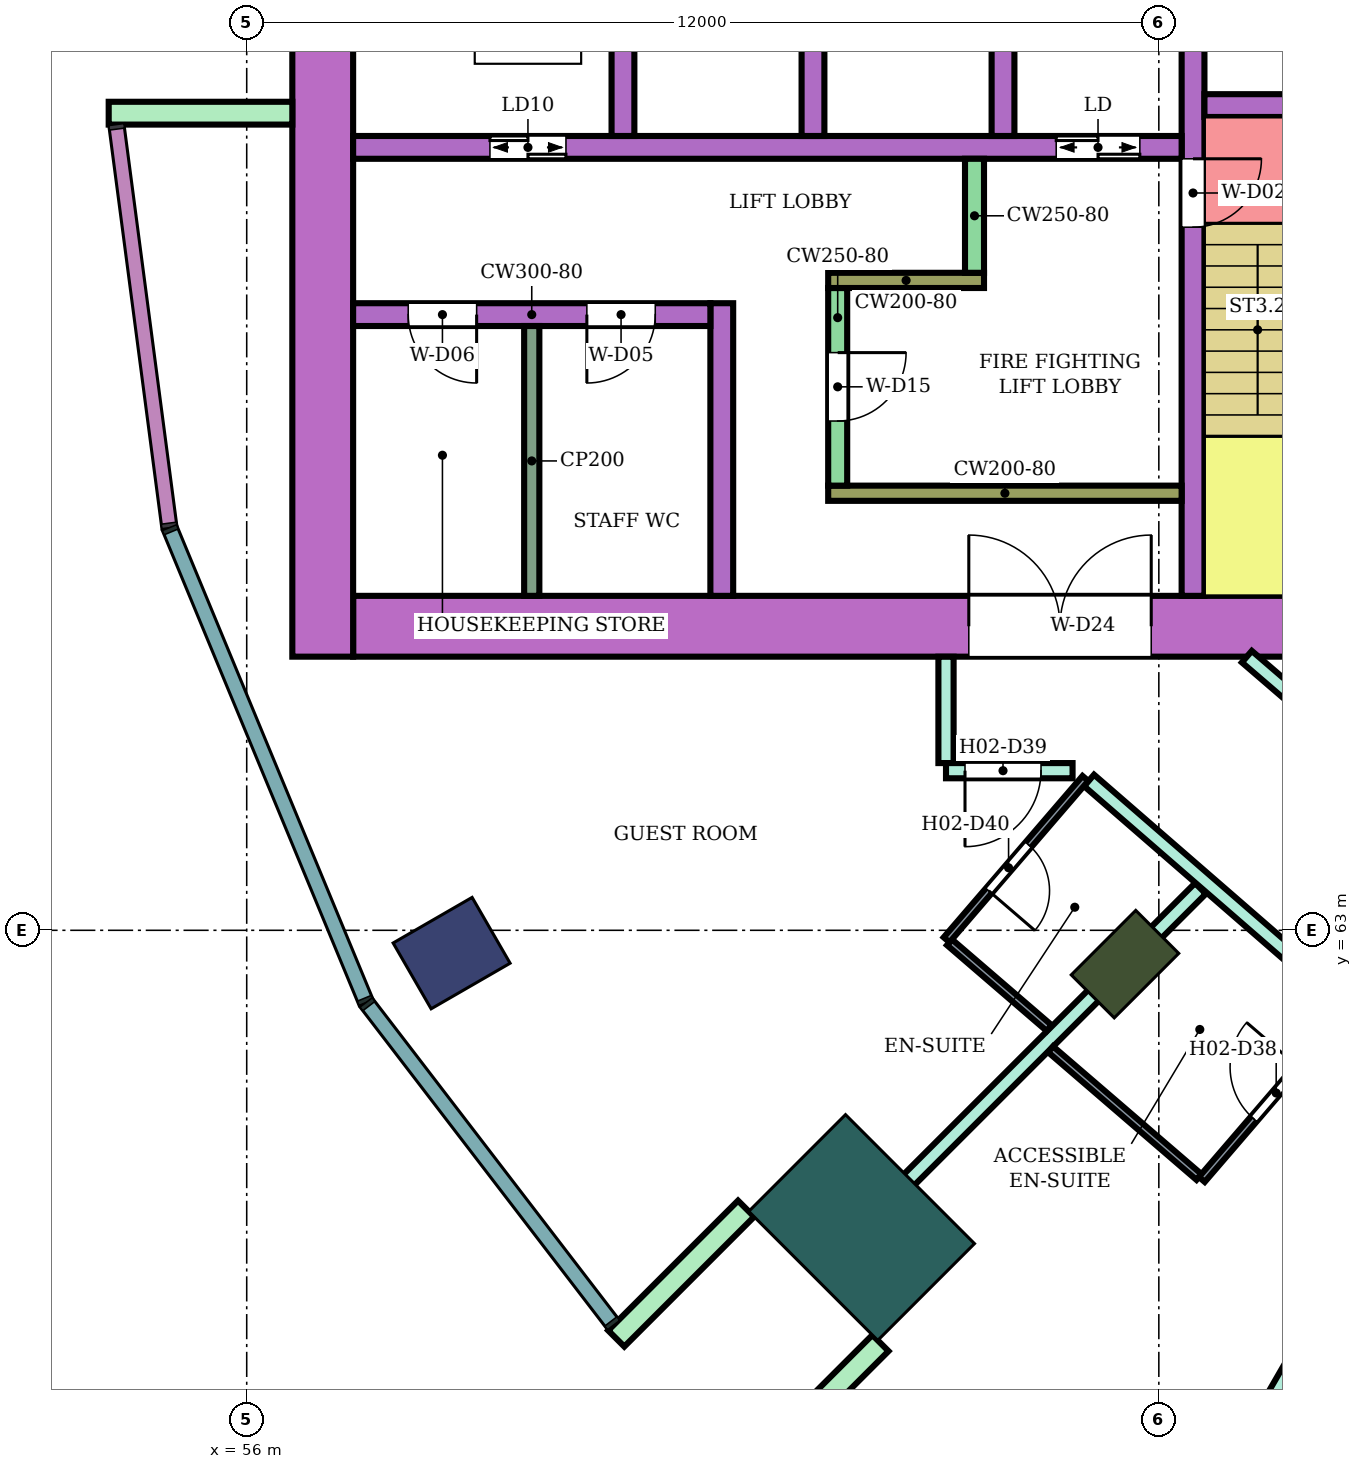
"""IFC4 building model, lengths in metres.
Left out: names, types, materials, properties, quantities, classifications, styles, units other than length and angle.
Written with IfcOpenShell. Run it as: python <this file> out.ifc"""

import sys

from ifc_helpers import new_model, si_unit, direction, frame, frame_2d, origin, origin_2d, place, context, subcontext, project, spatial, rectangle, extrude, element, fill, save


model = new_model("IFC4")
c1 = context("Model", 3, precision=1e-05, world=origin(), true_north=direction((0.0, 1.0)))
c2 = subcontext(c1, "Body", "Model", "MODEL_VIEW")
j1 = project(units=[si_unit("LENGTHUNIT", "METRE"), si_unit("PLANEANGLEUNIT", "RADIAN")], contexts=[c1])
p1 = place(None, origin())
s1 = spatial("IfcSite", under=j1, at=p1, CompositionType="ELEMENT")
p2 = place(p1, origin())
s2 = spatial("IfcBuilding", under=s1, at=p2, CompositionType="ELEMENT")
p3 = place(p2, frame((0.0, 0.0, 47.8)))
s3 = spatial("IfcBuildingStorey", under=s2, at=p3, CompositionType="ELEMENT", Elevation=47.8)
p4 = place(p3, frame((58.696, 62.7, 0.0), z_axis=(0.0, 0.0, 1.0), x_axis=(-0.866025403784, -0.5, 0.0)))
e1 = element("IfcColumn", 1, at=p4, inside=s3, PredefinedType="COLUMN", context=c2, shape_type="SweptSolid", body=[
    extrude(rectangle(XDim=1.2, YDim=1.0, at=origin_2d()), origin(), (0.0, 0.0, 1.0), 3.8),
])
p5 = place(p3, frame((67.555, 62.555, 0.0), z_axis=(0.0, 0.0, 1.0), x_axis=(-0.707106781187, -0.707106781187, 0.0)))
e2 = element("IfcColumn", 2, at=p5, inside=s3, PredefinedType="COLUMN", context=c2, shape_type="SweptSolid", body=[
    extrude(rectangle(XDim=1.2, YDim=0.8, at=origin_2d()), origin(), (0.0, 0.0, 1.0), 3.8),
])
p6 = place(p3, frame((64.09, 59.09, 0.0), z_axis=(0.0, 0.0, 1.0), x_axis=(-0.707106781187, -0.707106781187, 0.0)))
e3 = element("IfcColumn", 3, at=p6, inside=s3, PredefinedType="COLUMN", context=c2, shape_type="SweptSolid", body=[
    extrude(rectangle(XDim=1.8, YDim=2.4, at=origin_2d()), origin(), (0.0, 0.0, 1.0), 3.8),
])
p7 = place(p3, frame((72.1, 67.0, 0.0), z_axis=(0.0, 0.0, 1.0), x_axis=(-1.0, 0.0, 0.0)))
e4 = element("IfcWall", 4, at=p7, inside=s3, PredefinedType="SHEAR", context=c2, shape_type="SweptSolid", body=[
    extrude(rectangle(XDim=14.7, YDim=0.8, at=frame_2d((7.35, 0.0))), origin(), (0.0, 0.0, 1.0), 3.48),
])
p8 = place(p7, frame((4.2, 0.0, 0.0)))
e5 = element("IfcOpeningElement", 5, at=p8, cuts=e4, PredefinedType="OPENING", context=c2, shape_type="SweptSolid", body=[
    extrude(rectangle(XDim=2.4, YDim=2.4, at=frame_2d((1.2, 1.2))), frame((0.0, 0.41, 0.0), z_axis=(0.0, -1.0, 0.0), x_axis=(1.0, 0.0, 0.0)), (0.0, 0.0, 1.0), 0.82),
])
p9 = place(p3, frame((57.0, 83.4, 0.0), z_axis=(0.0, 0.0, 1.0), x_axis=(0.0, -1.0, 0.0)))
e6 = element("IfcWall", 6, at=p9, inside=s3, PredefinedType="SHEAR", context=c2, shape_type="SweptSolid", body=[
    extrude(rectangle(XDim=16.8, YDim=0.8, at=frame_2d((8.4, 0.0))), origin(), (0.0, 0.0, 1.0), 3.48),
])
p10 = place(p3, frame((68.45, 75.0, 0.0), z_axis=(0.0, 0.0, 1.0), x_axis=(0.0, -1.0, 0.0)))
e7 = element("IfcWall", 7, at=p10, inside=s3, PredefinedType="SHEAR", context=c2, shape_type="SweptSolid", body=[
    extrude(rectangle(XDim=7.6, YDim=0.3, at=frame_2d((3.8, 0.0))), origin(), (0.0, 0.0, 1.0), 3.48),
])
p11 = place(p10, frame((1.85, 0.0, 0.0)))
e8 = element("IfcOpeningElement", 8, at=p11, cuts=e7, PredefinedType="OPENING", context=c2, shape_type="SweptSolid", body=[
    extrude(rectangle(XDim=0.9, YDim=2.1, at=frame_2d((0.45, 1.05))), frame((0.0, 0.16, 0.0), z_axis=(0.0, -1.0, 0.0), x_axis=(1.0, 0.0, 0.0)), (0.0, 0.0, 1.0), 0.32),
])
p12 = place(p3, frame((71.65, 73.85, 0.0), z_axis=(0.0, 0.0, 1.0), x_axis=(-1.0, 0.0, 0.0)))
e9 = element("IfcWall", 9, at=p12, inside=s3, PredefinedType="SHEAR", context=c2, shape_type="SweptSolid", body=[
    extrude(rectangle(XDim=3.05, YDim=0.3, at=frame_2d((1.525, 0.0))), origin(), (0.0, 0.0, 1.0), 3.48),
])
p13 = place(p12, frame((1.1, 0.0, 0.0)))
e10 = element("IfcOpeningElement", 10, at=p13, cuts=e9, PredefinedType="OPENING", context=c2, shape_type="SweptSolid", body=[
    extrude(rectangle(XDim=0.7, YDim=2.0, at=frame_2d((0.35, 1.0))), frame((0.0, 0.16, 0.0), z_axis=(0.0, -1.0, 0.0), x_axis=(1.0, 0.0, 0.0)), (0.0, 0.0, 1.0), 0.32),
])
p14 = place(p3, frame((68.3, 73.3, 0.0), z_axis=(0.0, 0.0, 1.0), x_axis=(-1.0, 0.0, 0.0)))
e11 = element("IfcWall", 11, at=p14, inside=s3, PredefinedType="SHEAR", context=c2, shape_type="SweptSolid", body=[
    extrude(rectangle(XDim=10.9, YDim=0.3, at=frame_2d((5.45, 0.0))), origin(), (0.0, 0.0, 1.0), 3.48),
])
p15 = place(p14, frame((0.55, 0.0, 0.0)))
e12 = element("IfcOpeningElement", 12, at=p15, cuts=e11, PredefinedType="OPENING", context=c2, shape_type="SweptSolid", body=[
    extrude(rectangle(XDim=1.1, YDim=2.1, at=frame_2d((0.55, 1.05))), frame((0.0, 0.16, 0.0), z_axis=(0.0, -1.0, 0.0), x_axis=(1.0, 0.0, 0.0)), (0.0, 0.0, 1.0), 0.32),
])
p16 = place(p14, frame((8.1, 0.0, 0.0)))
e13 = element("IfcOpeningElement", 13, at=p16, cuts=e11, PredefinedType="OPENING", context=c2, shape_type="SweptSolid", body=[
    extrude(rectangle(XDim=1.0, YDim=2.1, at=frame_2d((0.5, 1.05))), frame((0.0, 0.16, 0.0), z_axis=(0.0, -1.0, 0.0), x_axis=(1.0, 0.0, 0.0)), (0.0, 0.0, 1.0), 0.32),
])
for number, where, z_axis, x_axis in (
    (14, (65.95, 76.0, 0.0), (0.0, 0.0, 1.0), (0.0, -1.0, 0.0)),
    (15, (63.45, 76.0, 0.0), (0.0, 0.0, 1.0), (0.0, -1.0, 0.0)),
    (16, (60.95, 76.0, 0.0), (0.0, 0.0, 1.0), (0.0, -1.0, 0.0)),
):
    element("IfcWall", number, at=place(p3, frame(where, z_axis=z_axis, x_axis=x_axis)), inside=s3, PredefinedType="SHEAR", context=c2, shape_type="SweptSolid", body=[
        extrude(rectangle(XDim=2.55, YDim=0.3, at=frame_2d((1.275, 0.0))), origin(), (0.0, 0.0, 1.0), 3.48),
    ])
p17 = place(p3, frame((68.3, 68.75, 0.0), z_axis=(0.0, 0.0, 1.0), x_axis=(-1.0, 0.0, 0.0)))
e17 = element("IfcWall", 17, at=p17, inside=s3, PredefinedType="SHEAR", context=c2, shape_type="SweptSolid", body=[
    extrude(rectangle(XDim=4.65, YDim=0.2, at=frame_2d((2.325, 0.0))), origin(), (0.0, 0.0, 1.0), 3.48),
])
p18 = place(p3, frame((63.775, 71.45, 0.0), z_axis=(0.0, 0.0, 1.0), x_axis=(0.0, -1.0, 0.0)))
e18 = element("IfcWall", 18, at=p18, inside=s3, PredefinedType="SHEAR", context=c2, shape_type="SweptSolid", body=[
    extrude(rectangle(XDim=2.6, YDim=0.25, at=frame_2d((1.3, 0.0))), origin(), (0.0, 0.0, 1.0), 3.48),
])
p19 = place(p18, frame((0.85, 0.0, 0.0)))
e19 = element("IfcOpeningElement", 19, at=p19, cuts=e18, PredefinedType="OPENING", context=c2, shape_type="SweptSolid", body=[
    extrude(rectangle(XDim=0.9, YDim=2.1, at=frame_2d((0.45, 1.05))), frame((0.0, 0.135, 0.0), z_axis=(0.0, -1.0, 0.0), x_axis=(1.0, 0.0, 0.0)), (0.0, 0.0, 1.0), 0.27),
])
p20 = place(p3, frame((65.7, 71.55, 0.0), z_axis=(0.0, 0.0, 1.0), x_axis=(-1.0, 0.0, 0.0)))
e20 = element("IfcWall", 20, at=p20, inside=s3, PredefinedType="SHEAR", context=c2, shape_type="SweptSolid", body=[
    extrude(rectangle(XDim=2.05, YDim=0.2, at=frame_2d((1.025, 0.0))), origin(), (0.0, 0.0, 1.0), 3.48),
])
p21 = place(p3, frame((65.575, 73.15, 0.0), z_axis=(0.0, 0.0, 1.0), x_axis=(0.0, -1.0, 0.0)))
e21 = element("IfcWall", 21, at=p21, inside=s3, PredefinedType="SHEAR", context=c2, shape_type="SweptSolid", body=[
    extrude(rectangle(XDim=1.5, YDim=0.25, at=frame_2d((0.75, 0.0))), origin(), (0.0, 0.0, 1.0), 3.48),
])
p22 = place(p3, frame((62.25, 71.25, 0.0), z_axis=(0.0, 0.0, 1.0), x_axis=(0.0, -1.0, 0.0)))
e22 = element("IfcWall", 22, at=p22, inside=s3, PredefinedType="SHEAR", context=c2, shape_type="SweptSolid", body=[
    extrude(rectangle(XDim=3.85, YDim=0.3, at=frame_2d((1.925, 0.0))), origin(), (0.0, 0.0, 1.0), 3.48),
])
p23 = place(p3, frame((62.1, 71.1, 0.0), z_axis=(0.0, 0.0, 1.0), x_axis=(-1.0, 0.0, 0.0)))
e23 = element("IfcWall", 23, at=p23, inside=s3, PredefinedType="SHEAR", context=c2, shape_type="SweptSolid", body=[
    extrude(rectangle(XDim=4.7, YDim=0.3, at=frame_2d((2.35, 0.0))), origin(), (0.0, 0.0, 1.0), 3.48),
])
p24 = place(p23, frame((0.725, 0.0, 0.0)))
e24 = element("IfcOpeningElement", 24, at=p24, cuts=e23, PredefinedType="OPENING", context=c2, shape_type="SweptSolid", body=[
    extrude(rectangle(XDim=0.9, YDim=2.1, at=frame_2d((0.45, 1.05))), frame((0.0, 0.16, 0.0), z_axis=(0.0, -1.0, 0.0), x_axis=(1.0, 0.0, 0.0)), (0.0, 0.0, 1.0), 0.32),
])
p25 = place(p23, frame((3.075, 0.0, 0.0)))
e25 = element("IfcOpeningElement", 25, at=p25, cuts=e23, PredefinedType="OPENING", context=c2, shape_type="SweptSolid", body=[
    extrude(rectangle(XDim=0.9, YDim=2.1, at=frame_2d((0.45, 1.05))), frame((0.0, 0.16, 0.0), z_axis=(0.0, -1.0, 0.0), x_axis=(1.0, 0.0, 0.0)), (0.0, 0.0, 1.0), 0.32),
])
for number, where, z_axis, x_axis in (
    (26, (56.6, 73.75, 0.0), (0.0, 0.0, 1.0), (-1.0, 0.0, 0.0)),
    (27, (62.57, 59.338, 0.0), (0.0, 0.0, 1.0), (-0.707, -0.707, 0.0)),
    (28, (64.338, 57.57, 0.0), (0.0, 0.0, 1.0), (-0.707, -0.707, 0.0)),
):
    element("IfcWall", number, at=place(p3, frame(where, z_axis=z_axis, x_axis=x_axis)), inside=s3, PredefinedType="NOTDEFINED", context=c2, shape_type="SweptSolid", body=[
        extrude(rectangle(XDim=2.416, YDim=0.3, at=frame_2d((1.208, 0.0))), origin(), (0.0, 0.0, 1.0), 3.8),
    ])
p26 = place(p3, frame((63.594, 58.598, 0.0), z_axis=(0.0, 0.0, 1.0), x_axis=(0.707228748718, 0.706984792613, 0.0)))
e29 = element("IfcWall", 29, at=p26, inside=s3, PredefinedType="PARTITIONING", context=c2, shape_type="SweptSolid", body=[
    extrude(rectangle(XDim=7.005, YDim=0.2, at=frame_2d((3.503, 0.0))), origin(), (0.0, 0.0, 1.0), 3.35),
])
p27 = place(p3, frame((65.2, 65.2, 0.0), z_axis=(0.0, 0.0, 1.0), x_axis=(0.0, 1.0, 0.0)))
e30 = element("IfcWall", 30, at=p27, inside=s3, PredefinedType="PARTITIONING", context=c2, shape_type="SweptSolid", body=[
    extrude(rectangle(XDim=1.399, YDim=0.2, at=frame_2d((0.7, 0.0))), origin(), (0.0, 0.0, 1.0), 3.35),
])
p28 = place(p3, frame((65.2, 65.1, 0.0), z_axis=(0.0, 0.0, 1.0), x_axis=(1.0, 0.0, 0.0)))
e31 = element("IfcWall", 31, at=p28, inside=s3, PredefinedType="PARTITIONING", context=c2, shape_type="SweptSolid", body=[
    extrude(rectangle(XDim=1.665, YDim=0.2, at=frame_2d((0.833, 0.0))), origin(), (0.0, 0.0, 1.0), 3.35),
])
p29 = place(p28, frame((0.25, 0.0, 0.0)))
e32 = element("IfcOpeningElement", 32, at=p29, cuts=e31, PredefinedType="OPENING", context=c2, shape_type="SweptSolid", body=[
    extrude(rectangle(XDim=1.0, YDim=2.1, at=frame_2d((0.5, 1.05))), frame((0.0, 0.11, 0.0), z_axis=(0.0, -1.0, 0.0), x_axis=(1.0, 0.0, 0.0)), (0.0, 0.0, 1.0), 0.22),
])
p30 = place(p3, frame((67.082, 64.972, 0.0), z_axis=(0.0, 0.0, 1.0), x_axis=(0.755033632617, -0.655686063309, 0.0)))
e33 = element("IfcWall", 33, at=p30, inside=s3, PredefinedType="PARTITIONING", context=c2, shape_type="SweptSolid", body=[
    extrude(rectangle(XDim=6.185, YDim=0.2, at=frame_2d((3.093, 0.0))), origin(), (0.0, 0.0, 1.0), 3.35),
])
p31 = place(p30, frame((4.778, 0.0, 0.0)))
e34 = element("IfcOpeningElement", 34, at=p31, cuts=e33, PredefinedType="OPENING", context=c2, shape_type="SweptSolid", body=[
    extrude(rectangle(XDim=1.1, YDim=2.1, at=frame_2d((0.55, 1.05))), frame((0.0, 0.11, 0.0), z_axis=(0.0, -1.0, 0.0), x_axis=(1.0, 0.0, 0.0)), (0.0, 0.0, 1.0), 0.22),
])
p32 = place(p3, frame((67.094, 52.663, 0.0), z_axis=(0.0, 0.0, 1.0), x_axis=(0.500216854217, 0.865900166738, 0.0)))
e35 = element("IfcWall", 35, at=p32, inside=s3, PredefinedType="PARTITIONING", context=c2, shape_type="SweptSolid", body=[
    extrude(rectangle(XDim=9.375, YDim=0.2, at=frame_2d((4.688, 0.0))), origin(), (0.0, 0.0, 1.0), 3.35),
])
p33 = place(p3, frame((69.158, 66.6, 0.0), z_axis=(0.0, 0.0, 1.0), x_axis=(0.758063092745, -0.652181222835, 0.0)))
e36 = element("IfcWall", 36, at=p33, inside=s3, PredefinedType="PARTITIONING", context=c2, shape_type="SweptSolid", body=[
    extrude(rectangle(XDim=5.16, YDim=0.2, at=frame_2d((2.58, 0.0))), origin(), (0.0, 0.0, 1.0), 3.35),
])
p34 = place(p33, frame((2.165, 0.0, 0.0)))
e37 = element("IfcOpeningElement", 37, at=p34, cuts=e36, PredefinedType="OPENING", context=c2, shape_type="SweptSolid", body=[
    extrude(rectangle(XDim=0.9, YDim=2.1, at=frame_2d((0.45, 1.05))), frame((0.0, 0.11, 0.0), z_axis=(0.0, -1.0, 0.0), x_axis=(1.0, 0.0, 0.0)), (0.0, 0.0, 1.0), 0.22),
])
p35 = place(p3, frame((65.246, 62.842, 0.0), z_axis=(0.0, 0.0, 1.0), x_axis=(0.758030338995, -0.652219292234, 0.0)))
e38 = element("IfcWall", 38, at=p35, inside=s3, PredefinedType="PARTITIONING", context=c2, shape_type="SweptSolid", body=[
    extrude(rectangle(XDim=1.73, YDim=0.1, at=frame_2d((0.865, 0.0))), origin(), (0.0, 0.0, 1.0), 3.35),
])
p36 = place(p3, frame((65.208, 62.875, 0.0), z_axis=(0.0, 0.0, 1.0), x_axis=(0.65205430601, 0.758172264076, 0.0)))
e39 = element("IfcWall", 39, at=p36, inside=s3, PredefinedType="PARTITIONING", context=c2, shape_type="SweptSolid", body=[
    extrude(rectangle(XDim=2.8, YDim=0.1, at=frame_2d((1.4, 0.0))), origin(), (0.0, 0.0, 1.0), 3.35),
])
p37 = place(p36, frame((0.85, 0.0, 0.0)))
e40 = element("IfcOpeningElement", 40, at=p37, cuts=e39, PredefinedType="OPENING", context=c2, shape_type="SweptSolid", body=[
    extrude(rectangle(XDim=0.8, YDim=2.1, at=frame_2d((0.4, 1.05))), frame((0.0, 0.06, 0.0), z_axis=(0.0, -1.0, 0.0), x_axis=(1.0, 0.0, 0.0)), (0.0, 0.0, 1.0), 0.12),
])
p38 = place(p3, frame((66.576, 61.435, 0.0), z_axis=(0.0, 0.0, 1.0), x_axis=(0.757970550281, -0.652288774169, 0.0)))
e41 = element("IfcWall", 41, at=p38, inside=s3, PredefinedType="PARTITIONING", context=c2, shape_type="SweptSolid", body=[
    extrude(rectangle(XDim=2.576, YDim=0.1, at=frame_2d((1.288, 0.0))), origin(), (0.0, 0.0, 1.0), 3.35),
])
p39 = place(p3, frame((68.566, 59.722, 0.0), z_axis=(0.0, 0.0, 1.0), x_axis=(0.65193146671, 0.758277892803, 0.0)))
e42 = element("IfcWall", 42, at=p39, inside=s3, PredefinedType="PARTITIONING", context=c2, shape_type="SweptSolid", body=[
    extrude(rectangle(XDim=2.89, YDim=0.1, at=frame_2d((1.445, 0.0))), origin(), (0.0, 0.0, 1.0), 3.35),
])
p40 = place(p39, frame((1.05, 0.0, 0.0)))
e43 = element("IfcOpeningElement", 43, at=p40, cuts=e42, PredefinedType="OPENING", context=c2, shape_type="SweptSolid", body=[
    extrude(rectangle(XDim=0.9, YDim=2.1, at=frame_2d((0.45, 1.05))), frame((0.0, 0.06, 0.0), z_axis=(0.0, -1.0, 0.0), x_axis=(1.0, 0.0, 0.0)), (0.0, 0.0, 1.0), 0.12),
])
p41 = place(p3, frame((59.75, 70.95, 0.0), z_axis=(0.0, 0.0, 1.0), x_axis=(0.0, -1.0, 0.0)))
e44 = element("IfcWall", 44, at=p41, inside=s3, PredefinedType="PARTITIONING", context=c2, shape_type="SweptSolid", body=[
    extrude(rectangle(XDim=3.55, YDim=0.2, at=frame_2d((1.775, 0.0))), origin(), (0.0, 0.0, 1.0), 3.48),
])
p42 = place(p40, origin())
e45 = element("IfcDoor", 45, at=p42, inside=s3, OperationType="SINGLE_SWING_RIGHT", PredefinedType="DOOR", context=c2, shape_type="SweptSolid", body=[
    extrude(rectangle(XDim=0.9, YDim=2.1, at=frame_2d((0.45, 1.05))), frame((0.0, 0.025, 0.0), z_axis=(0.0, -1.0, 0.0), x_axis=(1.0, 0.0, 0.0)), (0.0, 0.0, 1.0), 0.05),
])
fill(e43, e45)
p43 = place(p29, frame((1.0, 0.0, 0.0), z_axis=(0.0, 0.0, 1.0), x_axis=(-1.0, 0.0, 0.0)))
e46 = element("IfcDoor", 46, at=p43, inside=s3, OperationType="SINGLE_SWING_RIGHT", PredefinedType="DOOR", context=c2, shape_type="SweptSolid", body=[
    extrude(rectangle(XDim=1.0, YDim=2.1, at=frame_2d((0.5, 1.05))), frame((0.0, 0.025, 0.0), z_axis=(0.0, -1.0, 0.0), x_axis=(1.0, 0.0, 0.0)), (0.0, 0.0, 1.0), 0.05),
])
fill(e32, e46)
p44 = place(p37, frame((0.8, 0.0, 0.0), z_axis=(0.0, 0.0, 1.0), x_axis=(-1.0, 0.0, 0.0)))
e47 = element("IfcDoor", 47, at=p44, inside=s3, OperationType="SINGLE_SWING_RIGHT", PredefinedType="DOOR", context=c2, shape_type="SweptSolid", body=[
    extrude(rectangle(XDim=0.8, YDim=2.1, at=frame_2d((0.4, 1.05))), frame((0.0, 0.025, 0.0), z_axis=(0.0, -1.0, 0.0), x_axis=(1.0, 0.0, 0.0)), (0.0, 0.0, 1.0), 0.05),
])
fill(e40, e47)
p45 = place(p11, origin())
e48 = element("IfcDoor", 48, at=p45, inside=s3, OperationType="SINGLE_SWING_LEFT", PredefinedType="DOOR", context=c2, shape_type="SweptSolid", body=[
    extrude(rectangle(XDim=0.9, YDim=2.1, at=frame_2d((0.45, 1.05))), frame((0.0, 0.025, 0.0), z_axis=(0.0, -1.0, 0.0), x_axis=(1.0, 0.0, 0.0)), (0.0, 0.0, 1.0), 0.05),
])
fill(e8, e48)
p46 = place(p15, origin())
e49 = element("IfcDoor", 49, at=p46, inside=s3, OperationType="DOUBLE_DOOR_SLIDING", PredefinedType="DOOR", context=c2, shape_type="SweptSolid", body=[
    extrude(rectangle(XDim=1.1, YDim=2.1, at=frame_2d((0.55, 1.05))), frame((0.0, 0.025, 0.0), z_axis=(0.0, -1.0, 0.0), x_axis=(1.0, 0.0, 0.0)), (0.0, 0.0, 1.0), 0.05),
])
fill(e12, e49)
p47 = place(p16, origin())
e50 = element("IfcDoor", 50, at=p47, inside=s3, OperationType="DOUBLE_DOOR_SLIDING", PredefinedType="DOOR", context=c2, shape_type="SweptSolid", body=[
    extrude(rectangle(XDim=1.0, YDim=2.1, at=frame_2d((0.5, 1.05))), frame((0.0, 0.025, 0.0), z_axis=(0.0, -1.0, 0.0), x_axis=(1.0, 0.0, 0.0)), (0.0, 0.0, 1.0), 0.05),
])
fill(e13, e50)
p48 = place(p19, origin())
e51 = element("IfcDoor", 51, at=p48, inside=s3, OperationType="SINGLE_SWING_LEFT", PredefinedType="DOOR", context=c2, shape_type="SweptSolid", body=[
    extrude(rectangle(XDim=0.9, YDim=2.1, at=frame_2d((0.45, 1.05))), frame((0.0, 0.025, 0.0), z_axis=(0.0, -1.0, 0.0), x_axis=(1.0, 0.0, 0.0)), (0.0, 0.0, 1.0), 0.05),
])
fill(e19, e51)
p49 = place(p24, origin())
e52 = element("IfcDoor", 52, at=p49, inside=s3, OperationType="SINGLE_SWING_RIGHT", PredefinedType="DOOR", context=c2, shape_type="SweptSolid", body=[
    extrude(rectangle(XDim=0.9, YDim=2.1, at=frame_2d((0.45, 1.05))), frame((0.0, 0.025, 0.0), z_axis=(0.0, -1.0, 0.0), x_axis=(1.0, 0.0, 0.0)), (0.0, 0.0, 1.0), 0.05),
])
fill(e24, e52)
p50 = place(p25, origin())
e53 = element("IfcDoor", 53, at=p50, inside=s3, OperationType="SINGLE_SWING_LEFT", PredefinedType="DOOR", context=c2, shape_type="SweptSolid", body=[
    extrude(rectangle(XDim=0.9, YDim=2.1, at=frame_2d((0.45, 1.05))), frame((0.0, 0.025, 0.0), z_axis=(0.0, -1.0, 0.0), x_axis=(1.0, 0.0, 0.0)), (0.0, 0.0, 1.0), 0.05),
])
fill(e25, e53)
p51 = place(p8, frame((2.4, 0.0, 0.0), z_axis=(0.0, 0.0, 1.0), x_axis=(-1.0, 0.0, 0.0)))
e54 = element("IfcDoor", 54, at=p51, inside=s3, OperationType="DOUBLE_DOOR_SINGLE_SWING", PredefinedType="DOOR", context=c2, shape_type="SweptSolid", body=[
    extrude(rectangle(XDim=2.4, YDim=2.4, at=frame_2d((1.2, 1.2))), frame((0.0, 0.025, 0.0), z_axis=(0.0, -1.0, 0.0), x_axis=(1.0, 0.0, 0.0)), (0.0, 0.0, 1.0), 0.05),
])
fill(e5, e54)
save(model, sys.argv[1])
